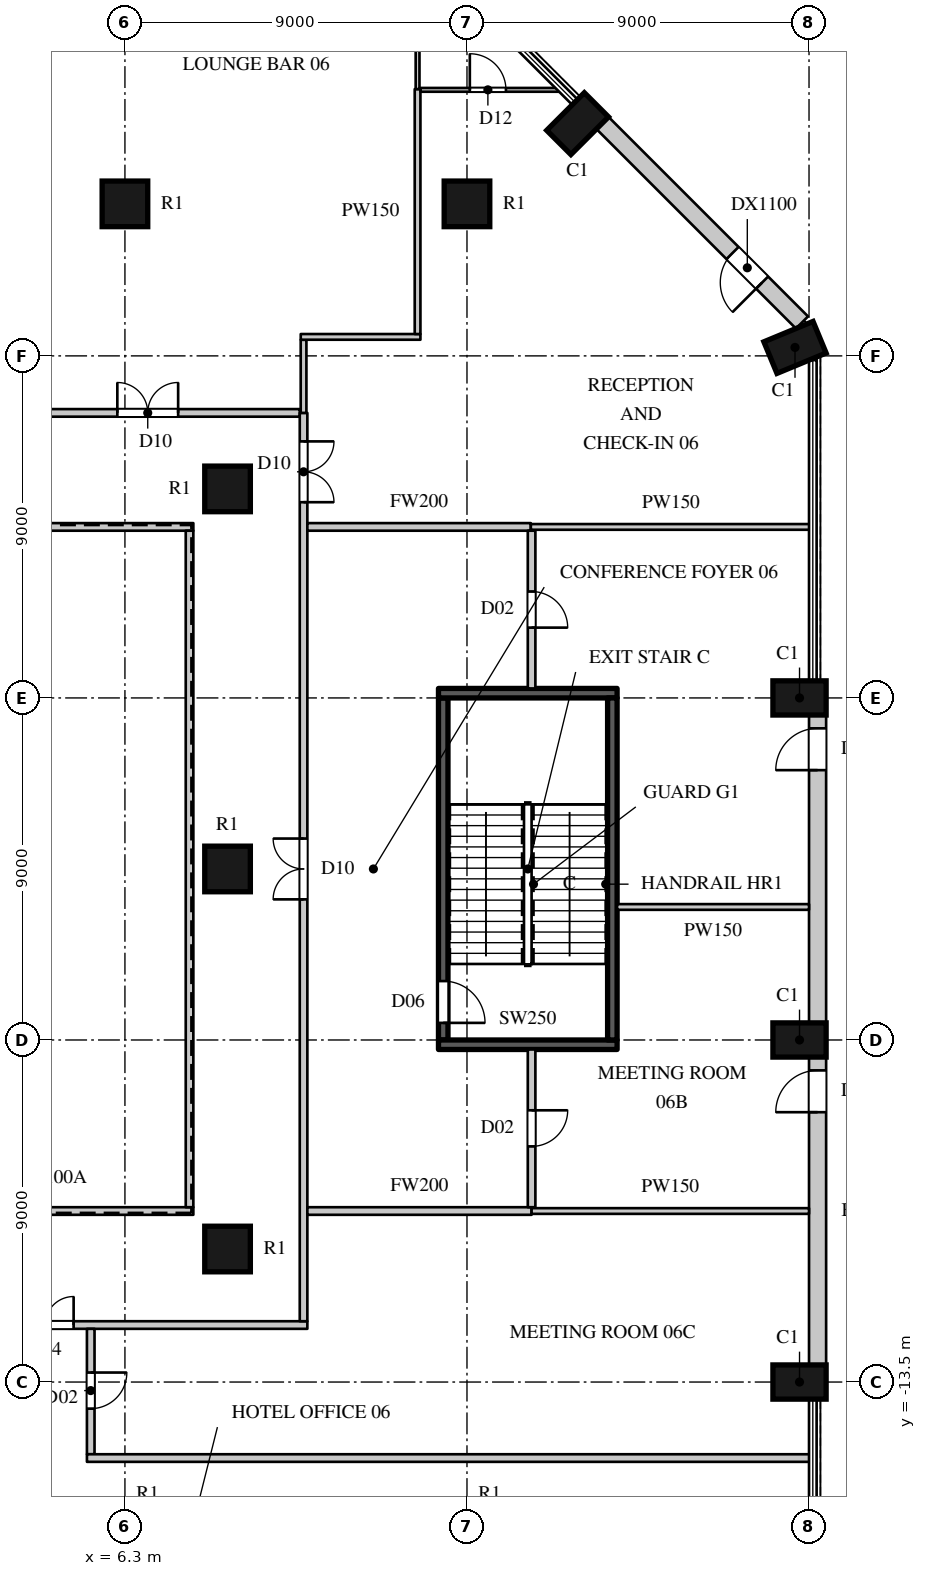
"""IFC4 building model, lengths in metres.
Left out: names, types, materials, properties, quantities, classifications, styles, units other than length and angle.
Written with IfcOpenShell. Run it as: python <this file> out.ifc"""

import sys

from ifc_helpers import new_model, si_unit, direction, frame, frame_2d, origin, origin_2d, place, context, subcontext, project, spatial, rectangle, circle, extrude, element, fill, save


model = new_model("IFC4")
c1 = context("Model", 3, precision=1e-05, world=origin(), true_north=direction((0.0, 1.0)))
c2 = subcontext(c1, "Body", "Model", "MODEL_VIEW")
j1 = project(units=[si_unit("LENGTHUNIT", "METRE"), si_unit("PLANEANGLEUNIT", "RADIAN")], contexts=[c1])
p1 = place(None, origin())
s1 = spatial("IfcSite", under=j1, at=p1, CompositionType="ELEMENT")
p2 = place(p1, origin())
s2 = spatial("IfcBuilding", under=s1, at=p2, CompositionType="ELEMENT")
p3 = place(p2, frame((0.0, 0.0, 50.0)))
s3 = spatial("IfcBuildingStorey", under=s2, at=p3, CompositionType="ELEMENT", Elevation=50.0)
for number, where, z_axis, x_axis in (
    (1, (24.05, -13.5, 0.0), (0.0, 0.0, 1.0), (0.0, 1.0, 0.0)),
    (2, (24.05, -4.5, 0.0), (0.0, 0.0, 1.0), (0.0, 1.0, 0.0)),
    (3, (24.05, 4.5, 0.0), (0.0, 0.0, 1.0), (0.0, 1.0, 0.0)),
    (4, (23.931, 13.723, 0.0), (0.0, 0.0, 1.0), (-0.383, 0.924, 0.0)),
    (5, (18.211, 19.611, 0.0), (0.0, 0.0, 1.0), (-0.707, 0.707, 0.0)),
):
    element("IfcColumn", number, at=place(p3, frame(where, z_axis=z_axis, x_axis=x_axis)), inside=s3, PredefinedType="COLUMN", context=c2, shape_type="SweptSolid", body=[
        extrude(rectangle(XDim=0.9, YDim=1.4, at=origin_2d()), origin(), (0.0, 0.0, 1.0), 5.5),
    ])
for number, where, z_axis, x_axis in (
    (6, (6.3, 17.5, 0.0), (0.0, 0.0, 1.0), (1.0, 0.0, 0.0)),
    (7, (15.3, 17.5, 0.0), (0.0, 0.0, 1.0), (1.0, 0.0, 0.0)),
    (8, (9.0, -10.0, 0.0), (0.0, 0.0, 1.0), (1.0, 0.0, 0.0)),
    (9, (9.0, 0.0, 0.0), (0.0, 0.0, 1.0), (1.0, 0.0, 0.0)),
    (10, (9.0, 10.0, 0.0), (0.0, 0.0, 1.0), (1.0, 0.0, 0.0)),
):
    element("IfcColumn", number, at=place(p3, frame(where, z_axis=z_axis, x_axis=x_axis)), inside=s3, PredefinedType="COLUMN", context=c2, shape_type="SweptSolid", body=[
        extrude(circle(Radius=0.6, at=origin_2d()), origin(), (0.0, 0.0, 1.0), 5.5),
    ])
p4 = place(p3, frame((24.525, -13.05, 0.0), z_axis=(0.0, 0.0, 1.0), x_axis=(0.0, 1.0, 0.0)))
e11 = element("IfcWall", 11, at=p4, inside=s3, PredefinedType="SOLIDWALL", context=c2, shape_type="SweptSolid", body=[
    extrude(rectangle(XDim=8.1, YDim=0.45, at=frame_2d((4.05, 0.0))), origin(), (0.0, 0.0, 1.0), 5.2),
])
p5 = place(p4, frame((6.65, 0.0, 0.0)))
e12 = element("IfcOpeningElement", 12, at=p5, cuts=e11, PredefinedType="OPENING", context=c2, shape_type="SweptSolid", body=[
    extrude(rectangle(XDim=1.1, YDim=2.4, at=frame_2d((0.55, 1.2))), frame((0.0, 0.235, 0.0), z_axis=(0.0, -1.0, 0.0), x_axis=(1.0, 0.0, 0.0)), (0.0, 0.0, 1.0), 0.47),
])
p6 = place(p3, frame((24.525, -4.05, 0.0), z_axis=(0.0, 0.0, 1.0), x_axis=(0.0, 1.0, 0.0)))
e13 = element("IfcWall", 13, at=p6, inside=s3, PredefinedType="SOLIDWALL", context=c2, shape_type="SweptSolid", body=[
    extrude(rectangle(XDim=8.1, YDim=0.45, at=frame_2d((4.05, 0.0))), origin(), (0.0, 0.0, 1.0), 5.2),
])
p7 = place(p6, frame((6.65, 0.0, 0.0)))
e14 = element("IfcOpeningElement", 14, at=p7, cuts=e13, PredefinedType="OPENING", context=c2, shape_type="SweptSolid", body=[
    extrude(rectangle(XDim=1.1, YDim=2.4, at=frame_2d((0.55, 1.2))), frame((0.0, 0.235, 0.0), z_axis=(0.0, -1.0, 0.0), x_axis=(1.0, 0.0, 0.0)), (0.0, 0.0, 1.0), 0.47),
])
p8 = place(p3, frame((24.115, 14.379, 0.0), z_axis=(0.0, 0.0, 1.0), x_axis=(-0.707106781187, 0.707106781187, 0.0)))
e15 = element("IfcWall", 15, at=p8, inside=s3, PredefinedType="SOLIDWALL", context=c2, shape_type="SweptSolid", body=[
    extrude(rectangle(XDim=7.424, YDim=0.45, at=frame_2d((3.712, 0.0))), origin(), (0.0, 0.0, 1.0), 5.2),
])
p9 = place(p8, frame((1.485, 0.0, 0.0)))
e16 = element("IfcOpeningElement", 16, at=p9, cuts=e15, PredefinedType="OPENING", context=c2, shape_type="SweptSolid", body=[
    extrude(rectangle(XDim=1.1, YDim=2.4, at=frame_2d((0.55, 1.2))), frame((0.0, 0.235, 0.0), z_axis=(0.0, -1.0, 0.0), x_axis=(1.0, 0.0, 0.0)), (0.0, 0.0, 1.0), 0.47),
])
p10 = place(p3, frame((-8.9, -12.0, 0.0), z_axis=(0.0, 0.0, 1.0), x_axis=(1.0, 0.0, 0.0)))
e17 = element("IfcWall", 17, at=p10, inside=s3, PredefinedType="PARTITIONING", context=c2, shape_type="SweptSolid", body=[
    extrude(rectangle(XDim=20.0, YDim=0.2, at=frame_2d((10.0, 0.0))), origin(), (0.0, 0.0, 1.0), 5.2),
])
p11 = place(p10, frame((5.2, 0.0, 0.0)))
e18 = element("IfcOpeningElement", 18, at=p11, cuts=e17, PredefinedType="OPENING", context=c2, shape_type="SweptSolid", body=[
    extrude(rectangle(XDim=1.6, YDim=2.4, at=frame_2d((0.8, 1.2))), frame((0.0, 0.11, 0.0), z_axis=(0.0, -1.0, 0.0), x_axis=(1.0, 0.0, 0.0)), (0.0, 0.0, 1.0), 0.22),
])
p12 = place(p10, frame((12.35, 0.0, 0.0)))
e19 = element("IfcOpeningElement", 19, at=p12, cuts=e17, PredefinedType="OPENING", context=c2, shape_type="SweptSolid", body=[
    extrude(rectangle(XDim=1.5, YDim=2.2, at=frame_2d((0.75, 1.1))), frame((0.0, 0.11, 0.0), z_axis=(0.0, -1.0, 0.0), x_axis=(1.0, 0.0, 0.0)), (0.0, 0.0, 1.0), 0.22),
])
p13 = place(p3, frame((-8.9, 12.0, 0.0), z_axis=(0.0, 0.0, 1.0), x_axis=(1.0, 0.0, 0.0)))
e20 = element("IfcWall", 20, at=p13, inside=s3, PredefinedType="PARTITIONING", context=c2, shape_type="SweptSolid", body=[
    extrude(rectangle(XDim=19.8, YDim=0.2, at=frame_2d((9.9, 0.0))), origin(), (0.0, 0.0, 1.0), 5.2),
])
p14 = place(p13, frame((5.2, 0.0, 0.0)))
e21 = element("IfcOpeningElement", 21, at=p14, cuts=e20, PredefinedType="OPENING", context=c2, shape_type="SweptSolid", body=[
    extrude(rectangle(XDim=1.6, YDim=2.4, at=frame_2d((0.8, 1.2))), frame((0.0, 0.11, 0.0), z_axis=(0.0, -1.0, 0.0), x_axis=(1.0, 0.0, 0.0)), (0.0, 0.0, 1.0), 0.22),
])
p15 = place(p13, frame((15.0, 0.0, 0.0)))
e22 = element("IfcOpeningElement", 22, at=p15, cuts=e20, PredefinedType="OPENING", context=c2, shape_type="SweptSolid", body=[
    extrude(rectangle(XDim=1.6, YDim=2.4, at=frame_2d((0.8, 1.2))), frame((0.0, 0.11, 0.0), z_axis=(0.0, -1.0, 0.0), x_axis=(1.0, 0.0, 0.0)), (0.0, 0.0, 1.0), 0.22),
])
for number, where, z_axis, x_axis in (
    (23, (-6.1, -9.0, 0.0), (0.0, 0.0, 1.0), (1.0, 0.0, 0.0)),
    (24, (-6.1, 9.0, 0.0), (0.0, 0.0, 1.0), (1.0, 0.0, 0.0)),
):
    element("IfcWall", number, at=place(p3, frame(where, z_axis=z_axis, x_axis=x_axis)), inside=s3, PredefinedType="PARTITIONING", context=c2, shape_type="SweptSolid", body=[
        extrude(rectangle(XDim=14.2, YDim=0.2, at=frame_2d((7.1, 0.0))), origin(), (0.0, 0.0, 1.0), 5.2),
    ])
p16 = place(p3, frame((5.4, -15.4, 0.0), z_axis=(0.0, 0.0, 1.0), x_axis=(0.0, 1.0, 0.0)))
e25 = element("IfcWall", 25, at=p16, inside=s3, PredefinedType="PARTITIONING", context=c2, shape_type="SweptSolid", body=[
    extrude(rectangle(XDim=3.3, YDim=0.2, at=frame_2d((1.65, 0.0))), origin(), (0.0, 0.0, 1.0), 5.2),
])
p17 = place(p16, frame((1.2, 0.0, 0.0)))
e26 = element("IfcOpeningElement", 26, at=p17, cuts=e25, PredefinedType="OPENING", context=c2, shape_type="SweptSolid", body=[
    extrude(rectangle(XDim=0.95, YDim=2.2, at=frame_2d((0.475, 1.1))), frame((0.0, 0.11, 0.0), z_axis=(0.0, -1.0, 0.0), x_axis=(1.0, 0.0, 0.0)), (0.0, 0.0, 1.0), 0.22),
])
p18 = place(p3, frame((5.3, -15.5, 0.0), z_axis=(0.0, 0.0, 1.0), x_axis=(1.0, 0.0, 0.0)))
e27 = element("IfcWall", 27, at=p18, inside=s3, PredefinedType="PARTITIONING", context=c2, shape_type="SweptSolid", body=[
    extrude(rectangle(XDim=19.055, YDim=0.2, at=frame_2d((9.527, 0.0))), origin(), (0.0, 0.0, 1.0), 5.2),
])
p19 = place(p3, frame((8.0, -8.9, 0.0), z_axis=(0.0, 0.0, 1.0), x_axis=(0.0, 1.0, 0.0)))
e28 = element("IfcWall", 28, at=p19, inside=s3, PredefinedType="PARTITIONING", context=c2, shape_type="SweptSolid", body=[
    extrude(rectangle(XDim=17.8, YDim=0.2, at=frame_2d((8.9, 0.0))), origin(), (0.0, 0.0, 1.0), 5.2),
])
p20 = place(p3, frame((11.0, -11.9, 0.0), z_axis=(0.0, 0.0, 1.0), x_axis=(0.0, 1.0, 0.0)))
e29 = element("IfcWall", 29, at=p20, inside=s3, PredefinedType="PARTITIONING", context=c2, shape_type="SweptSolid", body=[
    extrude(rectangle(XDim=23.9, YDim=0.2, at=frame_2d((11.95, 0.0))), origin(), (0.0, 0.0, 1.0), 5.2),
])
p21 = place(p20, frame((21.55, 0.0, 0.0)))
e30 = element("IfcOpeningElement", 30, at=p21, cuts=e29, PredefinedType="OPENING", context=c2, shape_type="SweptSolid", body=[
    extrude(rectangle(XDim=1.6, YDim=2.4, at=frame_2d((0.8, 1.2))), frame((0.0, 0.11, 0.0), z_axis=(0.0, -1.0, 0.0), x_axis=(1.0, 0.0, 0.0)), (0.0, 0.0, 1.0), 0.22),
])
p22 = place(p20, frame((11.1, 0.0, 0.0)))
e31 = element("IfcOpeningElement", 31, at=p22, cuts=e29, PredefinedType="OPENING", context=c2, shape_type="SweptSolid", body=[
    extrude(rectangle(XDim=1.6, YDim=2.4, at=frame_2d((0.8, 1.2))), frame((0.0, 0.11, 0.0), z_axis=(0.0, -1.0, 0.0), x_axis=(1.0, 0.0, 0.0)), (0.0, 0.0, 1.0), 0.22),
])
p23 = place(p3, frame((11.1, -9.0, 0.0), z_axis=(0.0, 0.0, 1.0), x_axis=(1.0, 0.0, 0.0)))
e32 = element("IfcWall", 32, at=p23, inside=s3, PredefinedType="PARTITIONING", context=c2, shape_type="SweptSolid", body=[
    extrude(rectangle(XDim=5.9, YDim=0.2, at=frame_2d((2.95, 0.0))), origin(), (0.0, 0.0, 1.0), 4.55),
])
p24 = place(p3, frame((11.1, 9.0, 0.0), z_axis=(0.0, 0.0, 1.0), x_axis=(1.0, 0.0, 0.0)))
e33 = element("IfcWall", 33, at=p24, inside=s3, PredefinedType="PARTITIONING", context=c2, shape_type="SweptSolid", body=[
    extrude(rectangle(XDim=5.88, YDim=0.2, at=frame_2d((2.94, 0.0))), origin(), (0.0, 0.0, 1.0), 4.55),
])
p25 = place(p3, frame((17.0, -8.9, 0.0), z_axis=(0.0, 0.0, 1.0), x_axis=(0.0, 1.0, 0.0)))
e34 = element("IfcWall", 34, at=p25, inside=s3, PredefinedType="PARTITIONING", context=c2, shape_type="SweptSolid", body=[
    extrude(rectangle(XDim=4.15, YDim=0.2, at=frame_2d((2.075, 0.0))), origin(), (0.0, 0.0, 1.0), 5.2),
])
p26 = place(p25, frame((1.6, 0.0, 0.0)))
e35 = element("IfcOpeningElement", 35, at=p26, cuts=e34, PredefinedType="OPENING", context=c2, shape_type="SweptSolid", body=[
    extrude(rectangle(XDim=0.95, YDim=2.2, at=frame_2d((0.475, 1.1))), frame((0.0, 0.11, 0.0), z_axis=(0.0, -1.0, 0.0), x_axis=(1.0, 0.0, 0.0)), (0.0, 0.0, 1.0), 0.22),
])
p27 = place(p3, frame((17.0, 4.75, 0.0), z_axis=(0.0, 0.0, 1.0), x_axis=(0.0, 1.0, 0.0)))
e36 = element("IfcWall", 36, at=p27, inside=s3, PredefinedType="PARTITIONING", context=c2, shape_type="SweptSolid", body=[
    extrude(rectangle(XDim=4.15, YDim=0.2, at=frame_2d((2.075, 0.0))), origin(), (0.0, 0.0, 1.0), 5.2),
])
p28 = place(p27, frame((1.6, 0.0, 0.0)))
e37 = element("IfcOpeningElement", 37, at=p28, cuts=e36, PredefinedType="OPENING", context=c2, shape_type="SweptSolid", body=[
    extrude(rectangle(XDim=0.95, YDim=2.2, at=frame_2d((0.475, 1.1))), frame((0.0, 0.11, 0.0), z_axis=(0.0, -1.0, 0.0), x_axis=(1.0, 0.0, 0.0)), (0.0, 0.0, 1.0), 0.22),
])
p29 = place(p3, frame((11.0, 12.0, 0.0), z_axis=(0.0, 0.0, 1.0), x_axis=(0.0, 1.0, 0.0)))
e38 = element("IfcWall", 38, at=p29, inside=s3, PredefinedType="PARTITIONING", context=c2, shape_type="SweptSolid", body=[
    extrude(rectangle(XDim=1.924, YDim=0.15, at=frame_2d((0.962, 0.0))), origin(), (0.0, 0.0, 1.0), 5.2),
])
p30 = place(p3, frame((10.926, 14.0, 0.0), z_axis=(0.0, 0.0, 1.0), x_axis=(1.0, 0.0, 0.0)))
e39 = element("IfcWall", 39, at=p30, inside=s3, PredefinedType="PARTITIONING", context=c2, shape_type="SweptSolid", body=[
    extrude(rectangle(XDim=3.149, YDim=0.15, at=frame_2d((1.574, 0.0))), origin(), (0.0, 0.0, 1.0), 5.2),
])
p31 = place(p3, frame((14.0, 14.075, 0.0), z_axis=(0.0, 0.0, 1.0), x_axis=(0.0, 1.0, 0.0)))
e40 = element("IfcWall", 40, at=p31, inside=s3, PredefinedType="PARTITIONING", context=c2, shape_type="SweptSolid", body=[
    extrude(rectangle(XDim=6.445, YDim=0.15, at=frame_2d((3.223, 0.0))), origin(), (0.0, 0.0, 1.0), 5.2),
])
p32 = place(p3, frame((16.98, 9.0, 0.0), z_axis=(0.0, 0.0, 1.0), x_axis=(1.0, 0.0, 0.0)))
e41 = element("IfcWall", 41, at=p32, inside=s3, PredefinedType="PARTITIONING", context=c2, shape_type="SweptSolid", body=[
    extrude(rectangle(XDim=7.375, YDim=0.15, at=frame_2d((3.688, 0.0))), origin(), (0.0, 0.0, 1.0), 4.55),
])
p33 = place(p3, frame((17.0, -9.0, 0.0), z_axis=(0.0, 0.0, 1.0), x_axis=(1.0, 0.0, 0.0)))
e42 = element("IfcWall", 42, at=p33, inside=s3, PredefinedType="PARTITIONING", context=c2, shape_type="SweptSolid", body=[
    extrude(rectangle(XDim=7.3, YDim=0.15, at=frame_2d((3.65, 0.0))), origin(), (0.0, 0.0, 1.0), 4.55),
])
p34 = place(p3, frame((19.25, -1.0, 0.0), z_axis=(0.0, 0.0, 1.0), x_axis=(1.0, 0.0, 0.0)))
e43 = element("IfcWall", 43, at=p34, inside=s3, PredefinedType="PARTITIONING", context=c2, shape_type="SweptSolid", body=[
    extrude(rectangle(XDim=5.05, YDim=0.15, at=frame_2d((2.525, 0.0))), origin(), (0.0, 0.0, 1.0), 5.2),
])
p35 = place(p3, frame((14.675, -4.5, 0.0), z_axis=(0.0, 0.0, 1.0), x_axis=(0.0, 1.0, 0.0)))
e44 = element("IfcWall", 44, at=p35, inside=s3, PredefinedType="SHEAR", context=c2, shape_type="SweptSolid", body=[
    extrude(rectangle(XDim=9.0, YDim=0.25, at=frame_2d((4.5, 0.0))), origin(), (0.0, 0.0, 1.0), 5.2),
])
p36 = place(p35, frame((0.45, 0.0, 0.0)))
e45 = element("IfcOpeningElement", 45, at=p36, cuts=e44, PredefinedType="OPENING", context=c2, shape_type="SweptSolid", body=[
    extrude(rectangle(XDim=1.1, YDim=2.2, at=frame_2d((0.55, 1.1))), frame((0.0, 0.135, 0.0), z_axis=(0.0, -1.0, 0.0), x_axis=(1.0, 0.0, 0.0)), (0.0, 0.0, 1.0), 0.27),
])
for number, where, z_axis, x_axis in (
    (46, (14.55, -4.625, 0.0), (0.0, 0.0, 1.0), (1.0, 0.0, 0.0)),
    (47, (14.55, 4.625, 0.0), (0.0, 0.0, 1.0), (1.0, 0.0, 0.0)),
):
    element("IfcWall", number, at=place(p3, frame(where, z_axis=z_axis, x_axis=x_axis)), inside=s3, PredefinedType="SHEAR", context=c2, shape_type="SweptSolid", body=[
        extrude(rectangle(XDim=4.7, YDim=0.25, at=frame_2d((2.35, 0.0))), origin(), (0.0, 0.0, 1.0), 5.2),
    ])
p37 = place(p3, frame((19.125, -4.5, 0.0), z_axis=(0.0, 0.0, 1.0), x_axis=(0.0, 1.0, 0.0)))
e48 = element("IfcWall", 48, at=p37, inside=s3, PredefinedType="SHEAR", context=c2, shape_type="SweptSolid", body=[
    extrude(rectangle(XDim=9.0, YDim=0.25, at=frame_2d((4.5, 0.0))), origin(), (0.0, 0.0, 1.0), 5.2),
])
p38 = place(p3, frame((14.0, 20.52, 0.0), z_axis=(0.0, 0.0, 1.0), x_axis=(0.0, 1.0, 0.0)))
e49 = element("IfcWall", 49, at=p38, inside=s3, PredefinedType="PARTITIONING", context=c2, shape_type="SweptSolid", body=[
    extrude(rectangle(XDim=3.733, YDim=0.1, at=frame_2d((1.867, 0.0))), origin(), (0.0, 0.0, 1.0), 5.2),
])
p39 = place(p3, frame((14.075, 20.5, 0.0), z_axis=(0.0, 0.0, 1.0), x_axis=(1.0, 0.0, 0.0)))
e50 = element("IfcWall", 50, at=p39, inside=s3, PredefinedType="PARTITIONING", context=c2, shape_type="SweptSolid", body=[
    extrude(rectangle(XDim=3.678, YDim=0.1, at=frame_2d((1.839, 0.0))), origin(), (0.0, 0.0, 1.0), 5.2),
])
p40 = place(p39, frame((1.3, 0.0, 0.0)))
e51 = element("IfcOpeningElement", 51, at=p40, cuts=e50, PredefinedType="OPENING", context=c2, shape_type="SweptSolid", body=[
    extrude(rectangle(XDim=0.95, YDim=2.2, at=frame_2d((0.475, 1.1))), frame((0.0, 0.06, 0.0), z_axis=(0.0, -1.0, 0.0), x_axis=(1.0, 0.0, 0.0)), (0.0, 0.0, 1.0), 0.12),
])
p41 = place(p5, origin())
e52 = element("IfcDoor", 52, at=p41, inside=s3, OperationType="SINGLE_SWING_LEFT", PredefinedType="DOOR", context=c2, shape_type="SweptSolid", body=[
    extrude(rectangle(XDim=1.1, YDim=2.4, at=frame_2d((0.55, 1.2))), frame((0.0, 0.025, 0.0), z_axis=(0.0, -1.0, 0.0), x_axis=(1.0, 0.0, 0.0)), (0.0, 0.0, 1.0), 0.05),
])
fill(e12, e52)
p42 = place(p7, origin())
e53 = element("IfcDoor", 53, at=p42, inside=s3, OperationType="SINGLE_SWING_LEFT", PredefinedType="DOOR", context=c2, shape_type="SweptSolid", body=[
    extrude(rectangle(XDim=1.1, YDim=2.4, at=frame_2d((0.55, 1.2))), frame((0.0, 0.025, 0.0), z_axis=(0.0, -1.0, 0.0), x_axis=(1.0, 0.0, 0.0)), (0.0, 0.0, 1.0), 0.05),
])
fill(e14, e53)
p43 = place(p9, origin())
e54 = element("IfcDoor", 54, at=p43, inside=s3, OperationType="SINGLE_SWING_LEFT", PredefinedType="DOOR", context=c2, shape_type="SweptSolid", body=[
    extrude(rectangle(XDim=1.1, YDim=2.4, at=frame_2d((0.55, 1.2))), frame((0.0, 0.025, 0.0), z_axis=(0.0, -1.0, 0.0), x_axis=(1.0, 0.0, 0.0)), (0.0, 0.0, 1.0), 0.05),
])
fill(e16, e54)
p44 = place(p15, origin())
e55 = element("IfcDoor", 55, at=p44, inside=s3, OperationType="DOUBLE_DOOR_SINGLE_SWING", PredefinedType="DOOR", context=c2, shape_type="SweptSolid", body=[
    extrude(rectangle(XDim=1.6, YDim=2.4, at=frame_2d((0.8, 1.2))), frame((0.0, 0.025, 0.0), z_axis=(0.0, -1.0, 0.0), x_axis=(1.0, 0.0, 0.0)), (0.0, 0.0, 1.0), 0.05),
])
fill(e22, e55)
p45 = place(p21, origin())
e56 = element("IfcDoor", 56, at=p45, inside=s3, OperationType="DOUBLE_DOOR_SINGLE_SWING", PredefinedType="DOOR", context=c2, shape_type="SweptSolid", body=[
    extrude(rectangle(XDim=1.6, YDim=2.4, at=frame_2d((0.8, 1.2))), frame((0.0, 0.025, 0.0), z_axis=(0.0, -1.0, 0.0), x_axis=(1.0, 0.0, 0.0)), (0.0, 0.0, 1.0), 0.05),
])
fill(e30, e56)
p46 = place(p22, origin())
e57 = element("IfcDoor", 57, at=p46, inside=s3, OperationType="DOUBLE_DOOR_SINGLE_SWING", PredefinedType="DOOR", context=c2, shape_type="SweptSolid", body=[
    extrude(rectangle(XDim=1.6, YDim=2.4, at=frame_2d((0.8, 1.2))), frame((0.0, 0.025, 0.0), z_axis=(0.0, -1.0, 0.0), x_axis=(1.0, 0.0, 0.0)), (0.0, 0.0, 1.0), 0.05),
])
fill(e31, e57)
p47 = place(p12, origin())
e58 = element("IfcDoor", 58, at=p47, inside=s3, OperationType="DOUBLE_DOOR_SINGLE_SWING", PredefinedType="DOOR", context=c2, shape_type="SweptSolid", body=[
    extrude(rectangle(XDim=1.5, YDim=2.2, at=frame_2d((0.75, 1.1))), frame((0.0, 0.025, 0.0), z_axis=(0.0, -1.0, 0.0), x_axis=(1.0, 0.0, 0.0)), (0.0, 0.0, 1.0), 0.05),
])
fill(e19, e58)
p48 = place(p40, origin())
e59 = element("IfcDoor", 59, at=p48, inside=s3, OperationType="SINGLE_SWING_LEFT", PredefinedType="DOOR", context=c2, shape_type="SweptSolid", body=[
    extrude(rectangle(XDim=0.95, YDim=2.2, at=frame_2d((0.475, 1.1))), frame((0.0, 0.025, 0.0), z_axis=(0.0, -1.0, 0.0), x_axis=(1.0, 0.0, 0.0)), (0.0, 0.0, 1.0), 0.05),
])
fill(e51, e59)
p49 = place(p28, origin())
e60 = element("IfcDoor", 60, at=p49, inside=s3, OperationType="SINGLE_SWING_RIGHT", PredefinedType="DOOR", context=c2, shape_type="SweptSolid", body=[
    extrude(rectangle(XDim=0.95, YDim=2.2, at=frame_2d((0.475, 1.1))), frame((0.0, 0.025, 0.0), z_axis=(0.0, -1.0, 0.0), x_axis=(1.0, 0.0, 0.0)), (0.0, 0.0, 1.0), 0.05),
])
fill(e37, e60)
p50 = place(p26, origin())
e61 = element("IfcDoor", 61, at=p50, inside=s3, OperationType="SINGLE_SWING_LEFT", PredefinedType="DOOR", context=c2, shape_type="SweptSolid", body=[
    extrude(rectangle(XDim=0.95, YDim=2.2, at=frame_2d((0.475, 1.1))), frame((0.0, 0.025, 0.0), z_axis=(0.0, -1.0, 0.0), x_axis=(1.0, 0.0, 0.0)), (0.0, 0.0, 1.0), 0.05),
])
fill(e35, e61)
p51 = place(p17, origin())
e62 = element("IfcDoor", 62, at=p51, inside=s3, OperationType="SINGLE_SWING_LEFT", PredefinedType="DOOR", context=c2, shape_type="SweptSolid", body=[
    extrude(rectangle(XDim=0.95, YDim=2.2, at=frame_2d((0.475, 1.1))), frame((0.0, 0.025, 0.0), z_axis=(0.0, -1.0, 0.0), x_axis=(1.0, 0.0, 0.0)), (0.0, 0.0, 1.0), 0.05),
])
fill(e26, e62)
p52 = place(p36, origin())
e63 = element("IfcDoor", 63, at=p52, inside=s3, OperationType="SINGLE_SWING_RIGHT", PredefinedType="DOOR", context=c2, shape_type="SweptSolid", body=[
    extrude(rectangle(XDim=1.1, YDim=2.2, at=frame_2d((0.55, 1.1))), frame((0.0, 0.025, 0.0), z_axis=(0.0, -1.0, 0.0), x_axis=(1.0, 0.0, 0.0)), (0.0, 0.0, 1.0), 0.05),
])
fill(e45, e63)
save(model, sys.argv[1])
